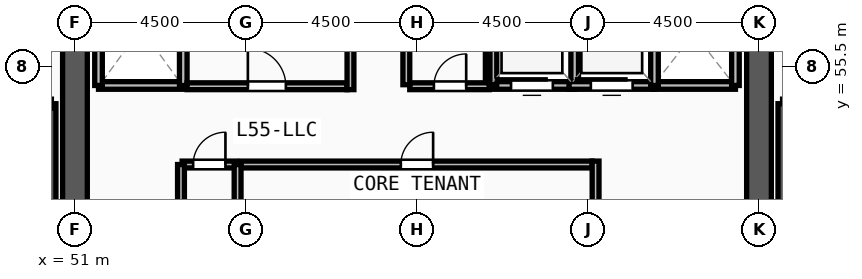
"""IFC4 building model, lengths in metres.
Left out: names, types, materials, properties, quantities, classifications, styles, units other than length and angle.
Written with IfcOpenShell. Run it as: python <this file> out.ifc"""

import sys

from ifc_helpers import new_model, si_unit, direction, frame, frame_2d, origin, place, context, subcontext, project, spatial, rectangle, extrude, source, transform, mapped, element, fill, save


model = new_model("IFC4")
c1 = context("Model", 3, precision=1e-05, world=origin(), true_north=direction((0.0, 1.0)))
c2 = subcontext(c1, "Body", "Model", "MODEL_VIEW")
j1 = project(units=[si_unit("LENGTHUNIT", "METRE"), si_unit("PLANEANGLEUNIT", "RADIAN")], contexts=[c1])
p1 = place(None, origin())
s1 = spatial("IfcSite", under=j1, at=p1, CompositionType="ELEMENT")
p2 = place(p1, origin())
s2 = spatial("IfcBuilding", under=s1, at=p2, CompositionType="ELEMENT")
p3 = place(p2, frame((0.0, 0.0, 213.0)))
s3 = spatial("IfcBuildingStorey", under=s2, at=p3, CompositionType="ELEMENT", Elevation=213.0)
p4 = place(p3, frame((69.0, 60.825, 0.0), z_axis=(0.0, 0.0, 1.0), x_axis=(0.0, -1.0, 0.0)))
e1 = element("IfcWall", 1, at=p4, inside=s3, PredefinedType="SHEAR", context=c2, shape_type="SweptSolid", body=[
    extrude(rectangle(XDim=13.65, YDim=0.65, at=frame_2d((6.825, 0.0))), origin(), (0.0, 0.0, 1.0), 3.57),
])
m1 = source(origin(), c2, "Body", "SweptSolid", [
    extrude(rectangle(XDim=1.2, YDim=2.2, at=frame_2d((0.6, 1.1))), frame((0.0, 0.335, 0.0), z_axis=(0.0, -1.0, 0.0), x_axis=(1.0, 0.0, 0.0)), (0.0, 0.0, 1.0), 0.67),
])
p5 = place(p4, frame((1.275, 0.0, 0.0)))
e2 = element("IfcOpeningElement", 2, at=p5, cuts=e1, PredefinedType="OPENING", context=c2, shape_type="MappedRepresentation", body=[
    mapped(m1, transform((0.0, 0.0, 0.0), x_axis=(1.0, 0.0, 0.0), y_axis=(0.0, 1.0, 0.0), z_axis=(0.0, 0.0, 1.0), scale=1.0)),
])
p6 = place(p3, frame((51.0, 47.175, 0.0), z_axis=(0.0, 0.0, 1.0), x_axis=(0.0, 1.0, 0.0)))
e3 = element("IfcWall", 3, at=p6, inside=s3, PredefinedType="SHEAR", context=c2, shape_type="SweptSolid", body=[
    extrude(rectangle(XDim=13.65, YDim=0.65, at=frame_2d((6.825, 0.0))), origin(), (0.0, 0.0, 1.0), 3.57),
])
for number, where, z_axis, x_axis in (
    (4, (50.38, 46.7, 0.0), (0.0, 0.0, 1.0), (0.0, 1.0, 0.0)),
    (5, (69.62, 54.52, 0.0), (0.0, 0.0, 1.0), (0.0, -1.0, 0.0)),
):
    element("IfcWall", number, at=place(p3, frame(where, z_axis=z_axis, x_axis=x_axis)), inside=s3, PredefinedType="SOLIDWALL", context=c2, shape_type="SweptSolid", body=[
        extrude(rectangle(XDim=7.82, YDim=0.24, at=frame_2d((3.91, 0.0))), origin(), (0.0, 0.0, 1.0), 3.57),
    ])
p7 = place(p3, frame((51.62, 55.0, 0.0), z_axis=(0.0, 0.0, 1.0), x_axis=(1.0, 0.0, 0.0)))
e6 = element("IfcWall", 6, at=p7, inside=s3, PredefinedType="SOLIDWALL", context=c2, shape_type="SweptSolid", body=[
    extrude(rectangle(XDim=2.23, YDim=0.2, at=frame_2d((1.115, 0.0))), origin(), (0.0, 0.0, 1.0), 3.57),
])
for number, where, z_axis, x_axis in (
    (7, (53.85, 55.0, 0.0), (0.0, 0.0, 1.0), (0.0, 1.0, 0.0)),
    (8, (51.62, 58.0, 0.0), (0.0, 0.0, 1.0), (0.0, -1.0, 0.0)),
):
    element("IfcWall", number, at=place(p3, frame(where, z_axis=z_axis, x_axis=x_axis)), inside=s3, PredefinedType="SOLIDWALL", context=c2, shape_type="SweptSolid", body=[
        extrude(rectangle(XDim=3.0, YDim=0.2, at=frame_2d((1.5, 0.0))), origin(), (0.0, 0.0, 1.0), 3.57),
    ])
p8 = place(p3, frame((66.2, 55.0, 0.0), z_axis=(0.0, 0.0, 1.0), x_axis=(1.0, 0.0, 0.0)))
e9 = element("IfcWall", 9, at=p8, inside=s3, PredefinedType="SOLIDWALL", context=c2, shape_type="SweptSolid", body=[
    extrude(rectangle(XDim=2.18, YDim=0.2, at=frame_2d((1.09, 0.0))), origin(), (0.0, 0.0, 1.0), 3.57),
])
p9 = place(p3, frame((68.38, 55.0, 0.0), z_axis=(0.0, 0.0, 1.0), x_axis=(0.0, 1.0, 0.0)))
e10 = element("IfcWall", 10, at=p9, inside=s3, PredefinedType="SOLIDWALL", context=c2, shape_type="SweptSolid", body=[
    extrude(rectangle(XDim=2.75, YDim=0.2, at=frame_2d((1.375, 0.0))), origin(), (0.0, 0.0, 1.0), 3.57),
])
p10 = place(p3, frame((61.9, 55.0, 0.0), z_axis=(0.0, 0.0, 1.0), x_axis=(1.0, 0.0, 0.0)))
e11 = element("IfcWall", 11, at=p10, inside=s3, PredefinedType="SOLIDWALL", context=c2, shape_type="SweptSolid", body=[
    extrude(rectangle(XDim=2.25, YDim=0.2, at=frame_2d((1.125, 0.0))), origin(), (0.0, 0.0, 1.0), 3.57),
])
m2 = source(origin(), c2, "Body", "SweptSolid", [
    extrude(rectangle(XDim=1.1, YDim=2.2, at=frame_2d((0.55, 1.1))), frame((0.0, 0.11, 0.0), z_axis=(0.0, -1.0, 0.0), x_axis=(1.0, 0.0, 0.0)), (0.0, 0.0, 1.0), 0.22),
])
p11 = place(p10, frame((0.575, 0.0, 0.0)))
e12 = element("IfcOpeningElement", 12, at=p11, cuts=e11, PredefinedType="OPENING", context=c2, shape_type="MappedRepresentation", body=[
    mapped(m2, transform((0.0, 0.0, 0.0), x_axis=(1.0, 0.0, 0.0), y_axis=(0.0, 1.0, 0.0), z_axis=(0.0, 0.0, 1.0), scale=1.0)),
])
for number, where, z_axis, x_axis in (
    (13, (64.15, 55.0, 0.0), (0.0, 0.0, 1.0), (0.0, 1.0, 0.0)),
    (14, (61.9, 57.6, 0.0), (0.0, 0.0, 1.0), (0.0, -1.0, 0.0)),
):
    element("IfcWall", number, at=place(p3, frame(where, z_axis=z_axis, x_axis=x_axis)), inside=s3, PredefinedType="SOLIDWALL", context=c2, shape_type="SweptSolid", body=[
        extrude(rectangle(XDim=2.6, YDim=0.2, at=frame_2d((1.3, 0.0))), origin(), (0.0, 0.0, 1.0), 3.57),
    ])
p12 = place(p3, frame((64.0, 55.0, 0.0), z_axis=(0.0, 0.0, 1.0), x_axis=(1.0, 0.0, 0.0)))
e15 = element("IfcWall", 15, at=p12, inside=s3, PredefinedType="SOLIDWALL", context=c2, shape_type="SweptSolid", body=[
    extrude(rectangle(XDim=2.25, YDim=0.2, at=frame_2d((1.125, 0.0))), origin(), (0.0, 0.0, 1.0), 3.57),
])
p13 = place(p12, frame((0.575, 0.0, 0.0)))
e16 = element("IfcOpeningElement", 16, at=p13, cuts=e15, PredefinedType="OPENING", context=c2, shape_type="MappedRepresentation", body=[
    mapped(m2, transform((0.0, 0.0, 0.0), x_axis=(1.0, 0.0, 0.0), y_axis=(0.0, 1.0, 0.0), z_axis=(0.0, 0.0, 1.0), scale=1.0)),
])
p14 = place(p3, frame((66.25, 55.0, 0.0), z_axis=(0.0, 0.0, 1.0), x_axis=(0.0, 1.0, 0.0)))
e17 = element("IfcWall", 17, at=p14, inside=s3, PredefinedType="SOLIDWALL", context=c2, shape_type="SweptSolid", body=[
    extrude(rectangle(XDim=2.6, YDim=0.2, at=frame_2d((1.3, 0.0))), origin(), (0.0, 0.0, 1.0), 3.57),
])
p15 = place(p3, frame((55.37, 52.92, 0.0), z_axis=(0.0, 0.0, 1.0), x_axis=(1.0, 0.0, 0.0)))
e18 = element("IfcWall", 18, at=p15, inside=s3, PredefinedType="PARTITIONING", context=c2, shape_type="SweptSolid", body=[
    extrude(rectangle(XDim=9.24, YDim=0.18, at=frame_2d((4.62, 0.0))), origin(), (0.0, 0.0, 1.0), 3.57),
])
m3 = source(origin(), c2, "Body", "SweptSolid", [
    extrude(rectangle(XDim=0.85, YDim=2.1, at=frame_2d((0.425, 1.05))), frame((0.0, 0.1, 0.0), z_axis=(0.0, -1.0, 0.0), x_axis=(1.0, 0.0, 0.0)), (0.0, 0.0, 1.0), 0.2),
])
p16 = place(p15, frame((4.205, 0.0, 0.0)))
e19 = element("IfcOpeningElement", 19, at=p16, cuts=e18, PredefinedType="OPENING", context=c2, shape_type="MappedRepresentation", body=[
    mapped(m3, transform((0.0, 0.0, 0.0), x_axis=(1.0, 0.0, 0.0), y_axis=(0.0, 1.0, 0.0), z_axis=(0.0, 0.0, 1.0), scale=1.0)),
])
p17 = place(p3, frame((53.95, 54.98, 0.0), z_axis=(0.0, 0.0, 1.0), x_axis=(1.0, 0.0, 0.0)))
e20 = element("IfcWall", 20, at=p17, inside=s3, PredefinedType="PARTITIONING", context=c2, shape_type="SweptSolid", body=[
    extrude(rectangle(XDim=4.21, YDim=0.18, at=frame_2d((2.105, 0.0))), origin(), (0.0, 0.0, 1.0), 3.57),
])
m4 = source(origin(), c2, "Body", "SweptSolid", [
    extrude(rectangle(XDim=1.0, YDim=2.2, at=frame_2d((0.5, 1.1))), frame((0.0, 0.1, 0.0), z_axis=(0.0, -1.0, 0.0), x_axis=(1.0, 0.0, 0.0)), (0.0, 0.0, 1.0), 0.2),
])
p18 = place(p17, frame((1.6, 0.0, 0.0)))
e21 = element("IfcOpeningElement", 21, at=p18, cuts=e20, PredefinedType="OPENING", context=c2, shape_type="MappedRepresentation", body=[
    mapped(m4, transform((0.0, 0.0, 0.0), x_axis=(1.0, 0.0, 0.0), y_axis=(0.0, 1.0, 0.0), z_axis=(0.0, 0.0, 1.0), scale=1.0)),
])
p19 = place(p3, frame((59.81, 54.98, 0.0), z_axis=(0.0, 0.0, 1.0), x_axis=(1.0, 0.0, 0.0)))
e22 = element("IfcWall", 22, at=p19, inside=s3, PredefinedType="PARTITIONING", context=c2, shape_type="SweptSolid", body=[
    extrude(rectangle(XDim=2.09, YDim=0.18, at=frame_2d((1.045, 0.0))), origin(), (0.0, 0.0, 1.0), 3.57),
])
p20 = place(p19, frame((0.635, 0.0, 0.0)))
e23 = element("IfcOpeningElement", 23, at=p20, cuts=e22, PredefinedType="OPENING", context=c2, shape_type="MappedRepresentation", body=[
    mapped(m3, transform((0.0, 0.0, 0.0), x_axis=(1.0, 0.0, 0.0), y_axis=(0.0, 1.0, 0.0), z_axis=(0.0, 0.0, 1.0), scale=1.0)),
])
p21 = place(p3, frame((53.82, 52.92, 0.0), z_axis=(0.0, 0.0, 1.0), x_axis=(1.0, 0.0, 0.0)))
e24 = element("IfcWall", 24, at=p21, inside=s3, PredefinedType="PARTITIONING", context=c2, shape_type="SweptSolid", body=[
    extrude(rectangle(XDim=1.43, YDim=0.18, at=frame_2d((0.715, 0.0))), origin(), (0.0, 0.0, 1.0), 3.57),
])
p22 = place(p21, frame((0.29, 0.0, 0.0)))
e25 = element("IfcOpeningElement", 25, at=p22, cuts=e24, PredefinedType="OPENING", context=c2, shape_type="MappedRepresentation", body=[
    mapped(m3, transform((0.0, 0.0, 0.0), x_axis=(1.0, 0.0, 0.0), y_axis=(0.0, 1.0, 0.0), z_axis=(0.0, 0.0, 1.0), scale=1.0)),
])
for number, where, z_axis, x_axis in (
    (26, (59.72, 55.02, 0.0), (0.0, 0.0, 1.0), (0.0, 1.0, 0.0)),
    (27, (62.01, 55.02, 0.0), (0.0, 0.0, 1.0), (0.0, 1.0, 0.0)),
):
    element("IfcWall", number, at=place(p3, frame(where, z_axis=z_axis, x_axis=x_axis)), inside=s3, PredefinedType="PARTITIONING", context=c2, shape_type="SweptSolid", body=[
        extrude(rectangle(XDim=2.88, YDim=0.18, at=frame_2d((1.44, 0.0))), origin(), (0.0, 0.0, 1.0), 3.57),
    ])
for number, where, z_axis, x_axis in (
    (28, (53.79, 50.35, 0.0), (0.0, 0.0, 1.0), (0.0, 1.0, 0.0)),
    (29, (55.28, 50.35, 0.0), (0.0, 0.0, 1.0), (0.0, 1.0, 0.0)),
):
    element("IfcWall", number, at=place(p3, frame(where, z_axis=z_axis, x_axis=x_axis)), inside=s3, PredefinedType="PARTITIONING", context=c2, shape_type="SweptSolid", body=[
        extrude(rectangle(XDim=2.57, YDim=0.18, at=frame_2d((1.285, 0.0))), origin(), (0.0, 0.0, 1.0), 3.57),
    ])
p23 = place(p3, frame((64.7, 50.36, 0.0), z_axis=(0.0, 0.0, 1.0), x_axis=(0.0, 1.0, 0.0)))
e30 = element("IfcWall", 30, at=p23, inside=s3, PredefinedType="PARTITIONING", context=c2, shape_type="SweptSolid", body=[
    extrude(rectangle(XDim=2.65, YDim=0.18, at=frame_2d((1.325, 0.0))), origin(), (0.0, 0.0, 1.0), 3.57),
])
p24 = place(p3, frame((58.25, 54.89, 0.0), z_axis=(0.0, 0.0, 1.0), x_axis=(0.0, 1.0, 0.0)))
e31 = element("IfcWall", 31, at=p24, inside=s3, PredefinedType="PARTITIONING", context=c2, shape_type="SweptSolid", body=[
    extrude(rectangle(XDim=3.02, YDim=0.18, at=frame_2d((1.51, 0.0))), origin(), (0.0, 0.0, 1.0), 3.57),
])
m5 = source(origin(), c2, "Body", "SweptSolid", [
    extrude(rectangle(XDim=1.1, YDim=2.2, at=frame_2d((0.55, 1.1))), frame((0.0, 0.025, 0.0), z_axis=(0.0, -1.0, 0.0), x_axis=(1.0, 0.0, 0.0)), (0.0, 0.0, 1.0), 0.05),
])
p25 = place(p11, origin())
e32 = element("IfcDoor", 32, at=p25, inside=s3, OperationType="SLIDING_TO_LEFT", PredefinedType="DOOR", context=c2, shape_type="MappedRepresentation", body=[
    mapped(m5, transform((0.0, 0.0, 0.0), x_axis=(1.0, 0.0, 0.0), y_axis=(0.0, 1.0, 0.0), z_axis=(0.0, 0.0, 1.0), scale=1.0)),
])
fill(e12, e32)
p26 = place(p13, origin())
e33 = element("IfcDoor", 33, at=p26, inside=s3, OperationType="SLIDING_TO_LEFT", PredefinedType="DOOR", context=c2, shape_type="MappedRepresentation", body=[
    mapped(m5, transform((0.0, 0.0, 0.0), x_axis=(1.0, 0.0, 0.0), y_axis=(0.0, 1.0, 0.0), z_axis=(0.0, 0.0, 1.0), scale=1.0)),
])
fill(e16, e33)
m6 = source(origin(), c2, "Body", "SweptSolid", [
    extrude(rectangle(XDim=0.85, YDim=2.1, at=frame_2d((0.425, 1.05))), frame((0.0, 0.025, 0.0), z_axis=(0.0, -1.0, 0.0), x_axis=(1.0, 0.0, 0.0)), (0.0, 0.0, 1.0), 0.05),
])
p27 = place(p16, origin())
e34 = element("IfcDoor", 34, at=p27, inside=s3, OperationType="SINGLE_SWING_RIGHT", PredefinedType="DOOR", context=c2, shape_type="MappedRepresentation", body=[
    mapped(m6, transform((0.0, 0.0, 0.0), x_axis=(1.0, 0.0, 0.0), y_axis=(0.0, 1.0, 0.0), z_axis=(0.0, 0.0, 1.0), scale=1.0)),
])
fill(e19, e34)
m7 = source(origin(), c2, "Body", "SweptSolid", [
    extrude(rectangle(XDim=1.0, YDim=2.2, at=frame_2d((0.5, 1.1))), frame((0.0, 0.025, 0.0), z_axis=(0.0, -1.0, 0.0), x_axis=(1.0, 0.0, 0.0)), (0.0, 0.0, 1.0), 0.05),
])
p28 = place(p18, origin())
e35 = element("IfcDoor", 35, at=p28, inside=s3, OperationType="SINGLE_SWING_LEFT", PredefinedType="DOOR", context=c2, shape_type="MappedRepresentation", body=[
    mapped(m7, transform((0.0, 0.0, 0.0), x_axis=(1.0, 0.0, 0.0), y_axis=(0.0, 1.0, 0.0), z_axis=(0.0, 0.0, 1.0), scale=1.0)),
])
fill(e21, e35)
p29 = place(p20, origin())
e36 = element("IfcDoor", 36, at=p29, inside=s3, OperationType="SINGLE_SWING_RIGHT", PredefinedType="DOOR", context=c2, shape_type="MappedRepresentation", body=[
    mapped(m6, transform((0.0, 0.0, 0.0), x_axis=(1.0, 0.0, 0.0), y_axis=(0.0, 1.0, 0.0), z_axis=(0.0, 0.0, 1.0), scale=1.0)),
])
fill(e23, e36)
p30 = place(p22, origin())
e37 = element("IfcDoor", 37, at=p30, inside=s3, OperationType="SINGLE_SWING_RIGHT", PredefinedType="DOOR", context=c2, shape_type="MappedRepresentation", body=[
    mapped(m6, transform((0.0, 0.0, 0.0), x_axis=(1.0, 0.0, 0.0), y_axis=(0.0, 1.0, 0.0), z_axis=(0.0, 0.0, 1.0), scale=1.0)),
])
fill(e25, e37)
save(model, sys.argv[1])
